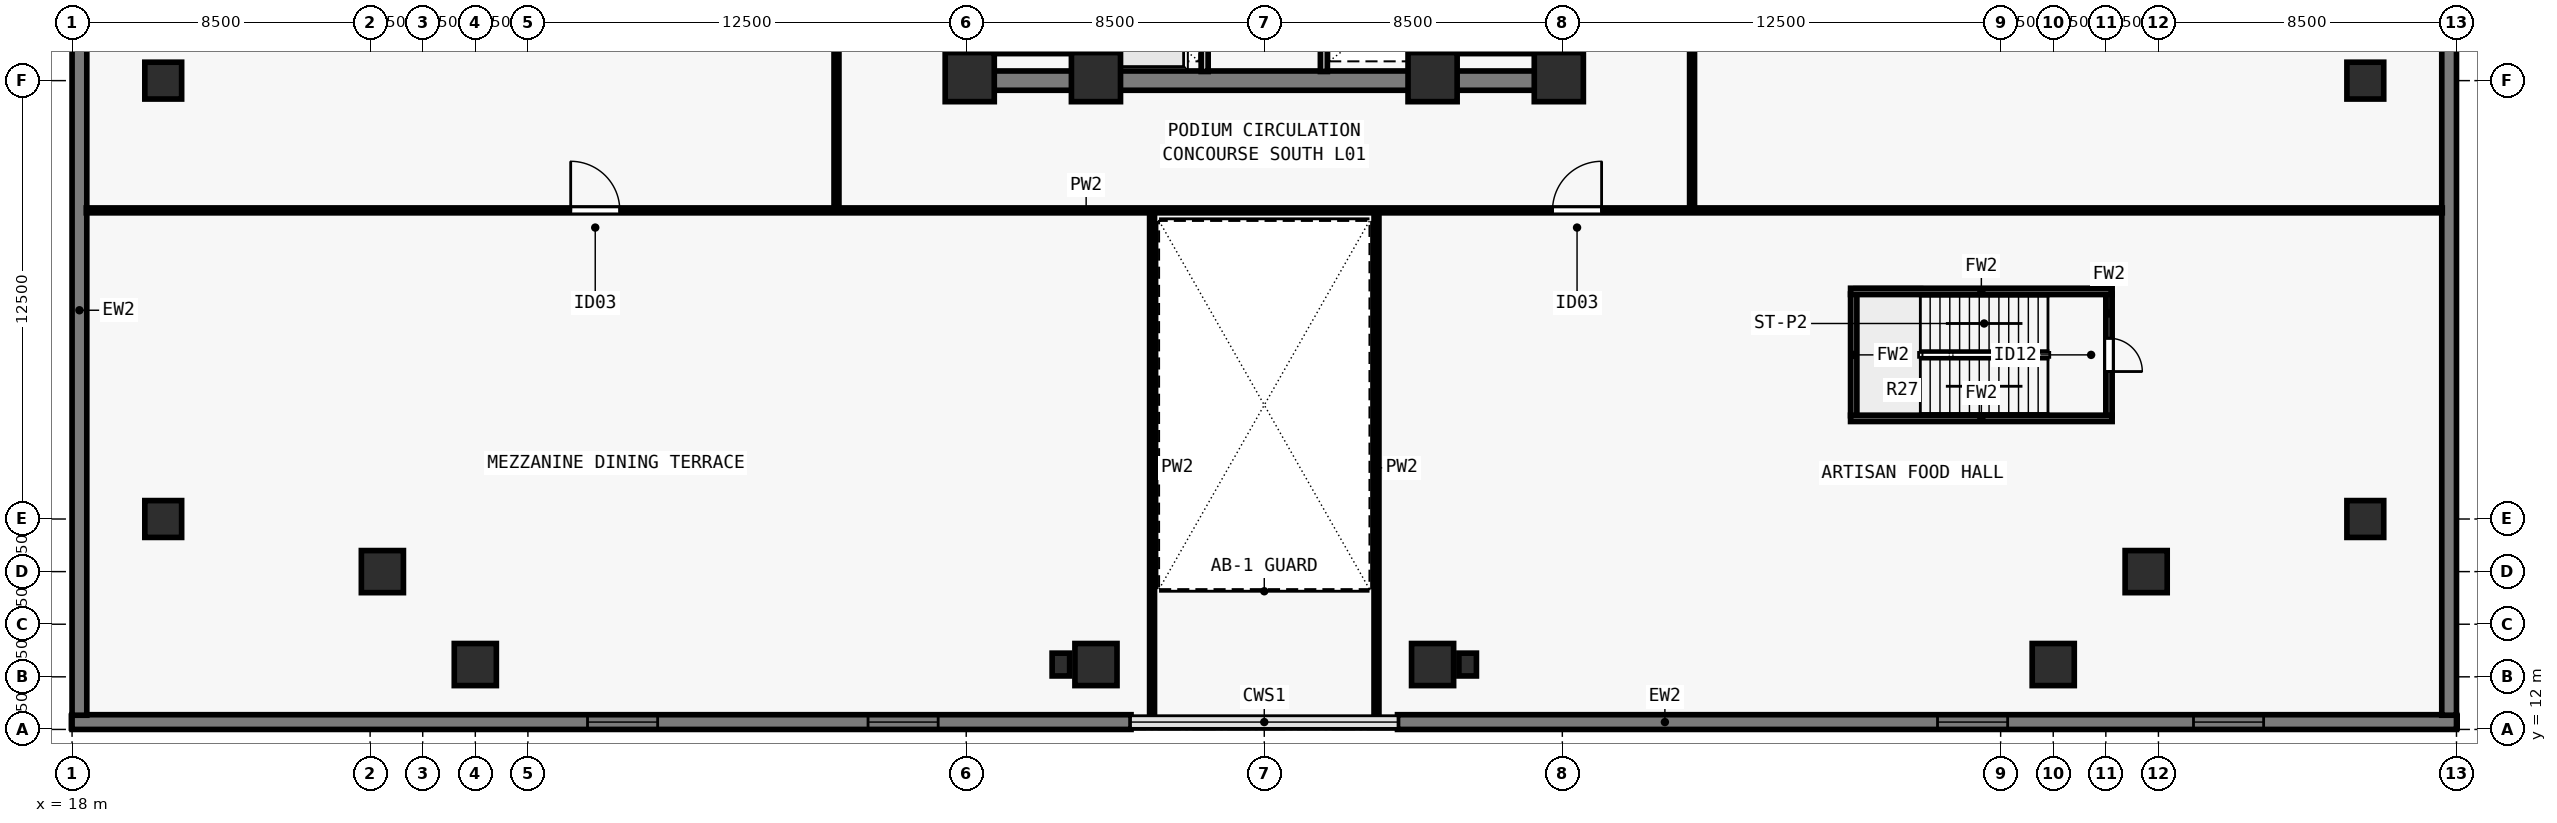
"""IFC4 building model, lengths in metres.
Left out: names, types, materials, properties, quantities, classifications, styles, units other than length and angle.
Written with IfcOpenShell. Run it as: python <this file> out.ifc"""

import sys

from ifc_helpers import new_model, si_unit, direction, frame, frame_2d, origin, origin_2d, place, context, subcontext, project, spatial, rectangle, extrude, element, fill, save


model = new_model("IFC4")
c1 = context("Model", 3, precision=1e-05, world=origin(), true_north=direction((0.0, 1.0)))
c2 = subcontext(c1, "Body", "Model", "MODEL_VIEW")
j1 = project(units=[si_unit("LENGTHUNIT", "METRE"), si_unit("PLANEANGLEUNIT", "RADIAN")], contexts=[c1])
p1 = place(None, origin())
s1 = spatial("IfcSite", under=j1, at=p1, CompositionType="ELEMENT")
p2 = place(p1, origin())
s2 = spatial("IfcBuilding", under=s1, at=p2, CompositionType="ELEMENT")
p3 = place(p2, frame((0.0, 0.0, 5.0)))
s3 = spatial("IfcBuildingStorey", under=s2, at=p3, CompositionType="ELEMENT", Elevation=5.0)
for number, where, z_axis, x_axis in (
    (1, (43.6, 30.6, 0.0), (0.0, 0.0, 1.0), (1.0, 0.0, 0.0)),
    (2, (47.2, 30.6, 0.0), (0.0, 0.0, 1.0), (1.0, 0.0, 0.0)),
    (3, (56.8, 30.6, 0.0), (0.0, 0.0, 1.0), (1.0, 0.0, 0.0)),
    (4, (60.4, 30.6, 0.0), (0.0, 0.0, 1.0), (1.0, 0.0, 0.0)),
):
    element("IfcColumn", number, at=place(p3, frame(where, z_axis=z_axis, x_axis=x_axis)), inside=s3, PredefinedType="COLUMN", context=c2, shape_type="SweptSolid", body=[
        extrude(rectangle(XDim=1.4, YDim=1.4, at=origin_2d()), origin(), (0.0, 0.0, 1.0), 5.0),
    ])
for number, where, z_axis, x_axis in (
    (5, (29.5, 13.85, 0.0), (0.0, 0.0, 1.0), (1.0, 0.0, 0.0)),
    (6, (47.2, 13.85, 0.0), (0.0, 0.0, 1.0), (1.0, 0.0, 0.0)),
    (7, (56.8, 13.85, 0.0), (0.0, 0.0, 1.0), (1.0, 0.0, 0.0)),
    (8, (74.5, 13.85, 0.0), (0.0, 0.0, 1.0), (1.0, 0.0, 0.0)),
    (9, (77.15, 16.5, 0.0), (0.0, 0.0, 1.0), (1.0, 0.0, 0.0)),
    (10, (26.85, 16.5, 0.0), (0.0, 0.0, 1.0), (1.0, 0.0, 0.0)),
):
    element("IfcColumn", number, at=place(p3, frame(where, z_axis=z_axis, x_axis=x_axis)), inside=s3, PredefinedType="COLUMN", context=c2, shape_type="SweptSolid", body=[
        extrude(rectangle(XDim=1.2, YDim=1.2, at=origin_2d()), origin(), (0.0, 0.0, 1.0), 5.0),
    ])
for number, where, z_axis, x_axis in (
    (11, (46.2, 13.85, 0.0), (0.0, 0.0, 1.0), (1.0, 0.0, 0.0)),
    (12, (57.8, 13.85, 0.0), (0.0, 0.0, 1.0), (1.0, 0.0, 0.0)),
):
    element("IfcColumn", number, at=place(p3, frame(where, z_axis=z_axis, x_axis=x_axis)), inside=s3, PredefinedType="PILASTER", context=c2, shape_type="SweptSolid", body=[
        extrude(rectangle(XDim=0.5, YDim=0.65, at=origin_2d()), origin(), (0.0, 0.0, 1.0), 5.0),
    ])
for number, where, z_axis, x_axis in (
    (13, (20.6, 18.0, 0.0), (0.0, 0.0, 1.0), (1.0, 0.0, 0.0)),
    (14, (20.6, 30.5, 0.0), (0.0, 0.0, 1.0), (1.0, 0.0, 0.0)),
    (15, (83.4, 18.0, 0.0), (0.0, 0.0, 1.0), (1.0, 0.0, 0.0)),
    (16, (83.4, 30.5, 0.0), (0.0, 0.0, 1.0), (1.0, 0.0, 0.0)),
):
    element("IfcColumn", number, at=place(p3, frame(where, z_axis=z_axis, x_axis=x_axis)), inside=s3, PredefinedType="COLUMN", context=c2, shape_type="SweptSolid", body=[
        extrude(rectangle(XDim=1.05, YDim=1.05, at=origin_2d()), origin(), (0.0, 0.0, 1.0), 5.0),
    ])
p4 = place(p3, frame((86.0, 12.21, 0.0), z_axis=(0.0, 0.0, 1.0), x_axis=(-1.0, 0.0, 0.0)))
e17 = element("IfcWall", 17, at=p4, inside=s3, PredefinedType="SOLIDWALL", context=c2, shape_type="SweptSolid", body=[
    extrude(rectangle(XDim=30.2, YDim=0.42, at=frame_2d((15.1, 0.0))), origin(), (0.0, 0.0, 1.0), 4.72),
])
p5 = place(p4, frame((5.5, 0.0, 0.8)))
e18 = element("IfcOpeningElement", 18, at=p5, cuts=e17, PredefinedType="OPENING", context=c2, shape_type="SweptSolid", body=[
    extrude(rectangle(XDim=2.0, YDim=2.4, at=frame_2d((1.0, 1.2))), frame((0.0, 0.22, 0.0), z_axis=(0.0, -1.0, 0.0), x_axis=(1.0, 0.0, 0.0)), (0.0, 0.0, 1.0), 0.44),
])
p6 = place(p4, frame((12.8, 0.0, 0.8)))
e19 = element("IfcOpeningElement", 19, at=p6, cuts=e17, PredefinedType="OPENING", context=c2, shape_type="SweptSolid", body=[
    extrude(rectangle(XDim=2.0, YDim=2.4, at=frame_2d((1.0, 1.2))), frame((0.0, 0.22, 0.0), z_axis=(0.0, -1.0, 0.0), x_axis=(1.0, 0.0, 0.0)), (0.0, 0.0, 1.0), 0.44),
])
p7 = place(p3, frame((48.2, 12.21, 0.0), z_axis=(0.0, 0.0, 1.0), x_axis=(-1.0, 0.0, 0.0)))
e20 = element("IfcWall", 20, at=p7, inside=s3, PredefinedType="SOLIDWALL", context=c2, shape_type="SweptSolid", body=[
    extrude(rectangle(XDim=30.2, YDim=0.42, at=frame_2d((15.1, 0.0))), origin(), (0.0, 0.0, 1.0), 4.72),
])
p8 = place(p7, frame((5.5, 0.0, 0.8)))
e21 = element("IfcOpeningElement", 21, at=p8, cuts=e20, PredefinedType="OPENING", context=c2, shape_type="SweptSolid", body=[
    extrude(rectangle(XDim=2.0, YDim=2.4, at=frame_2d((1.0, 1.2))), frame((0.0, 0.22, 0.0), z_axis=(0.0, -1.0, 0.0), x_axis=(1.0, 0.0, 0.0)), (0.0, 0.0, 1.0), 0.44),
])
p9 = place(p7, frame((13.5, 0.0, 0.8)))
e22 = element("IfcOpeningElement", 22, at=p9, cuts=e20, PredefinedType="OPENING", context=c2, shape_type="SweptSolid", body=[
    extrude(rectangle(XDim=2.0, YDim=2.4, at=frame_2d((1.0, 1.2))), frame((0.0, 0.22, 0.0), z_axis=(0.0, -1.0, 0.0), x_axis=(1.0, 0.0, 0.0)), (0.0, 0.0, 1.0), 0.44),
])
for number, where, z_axis, x_axis in (
    (23, (85.79, 35.5, 0.0), (0.0, 0.0, 1.0), (0.0, -1.0, 0.0)),
    (24, (18.21, 12.405, 0.0), (0.0, 0.0, 1.0), (0.0, 1.0, 0.0)),
):
    element("IfcWall", number, at=place(p3, frame(where, z_axis=z_axis, x_axis=x_axis)), inside=s3, PredefinedType="SOLIDWALL", context=c2, shape_type="SweptSolid", body=[
        extrude(rectangle(XDim=23.095, YDim=0.42, at=frame_2d((11.547, 0.0))), origin(), (0.0, 0.0, 1.0), 4.72),
    ])
p10 = place(p3, frame((43.225, 30.5, 0.0), z_axis=(0.0, 0.0, 1.0), x_axis=(1.0, 0.0, 0.0)))
e25 = element("IfcWall", 25, at=p10, inside=s3, PredefinedType="SHEAR", context=c2, shape_type="SweptSolid", body=[
    extrude(rectangle(XDim=17.55, YDim=0.55, at=frame_2d((8.775, 0.0))), origin(), (0.0, 0.0, 1.0), 4.72),
])
for number, where, z_axis, x_axis in (
    (26, (43.5, 30.765, 0.0), (0.0, 0.0, 1.0), (0.0, 1.0, 0.0)),
    (27, (60.5, 30.765, 0.0), (0.0, 0.0, 1.0), (0.0, 1.0, 0.0)),
):
    element("IfcWall", number, at=place(p3, frame(where, z_axis=z_axis, x_axis=x_axis)), inside=s3, PredefinedType="SHEAR", context=c2, shape_type="SweptSolid", body=[
        extrude(rectangle(XDim=7.985, YDim=0.55, at=frame_2d((3.993, 0.0))), origin(), (0.0, 0.0, 1.0), 4.72),
    ])
p11 = place(p3, frame((50.3, 30.76, 0.0), z_axis=(0.0, 0.0, 1.0), x_axis=(0.0, 1.0, 0.0)))
e28 = element("IfcWall", 28, at=p11, inside=s3, PredefinedType="SOLIDWALL", context=c2, shape_type="SweptSolid", body=[
    extrude(rectangle(XDim=7.855, YDim=0.2, at=frame_2d((3.927, 0.0))), origin(), (0.0, 0.0, 1.0), 4.72),
])
p12 = place(p11, frame((0.79, 0.0, 0.0)))
e29 = element("IfcOpeningElement", 29, at=p12, cuts=e28, PredefinedType="OPENING", context=c2, shape_type="SweptSolid", body=[
    extrude(rectangle(XDim=1.1, YDim=2.2, at=frame_2d((0.55, 1.1))), frame((0.0, 0.11, 0.0), z_axis=(0.0, -1.0, 0.0), x_axis=(1.0, 0.0, 0.0)), (0.0, 0.0, 1.0), 0.22),
])
p13 = place(p11, frame((3.49, 0.0, 0.0)))
e30 = element("IfcOpeningElement", 30, at=p13, cuts=e28, PredefinedType="OPENING", context=c2, shape_type="SweptSolid", body=[
    extrude(rectangle(XDim=1.1, YDim=2.2, at=frame_2d((0.55, 1.1))), frame((0.0, 0.11, 0.0), z_axis=(0.0, -1.0, 0.0), x_axis=(1.0, 0.0, 0.0)), (0.0, 0.0, 1.0), 0.22),
])
p14 = place(p11, frame((6.19, 0.0, 0.0)))
e31 = element("IfcOpeningElement", 31, at=p14, cuts=e28, PredefinedType="OPENING", context=c2, shape_type="SweptSolid", body=[
    extrude(rectangle(XDim=1.1, YDim=2.2, at=frame_2d((0.55, 1.1))), frame((0.0, 0.11, 0.0), z_axis=(0.0, -1.0, 0.0), x_axis=(1.0, 0.0, 0.0)), (0.0, 0.0, 1.0), 0.22),
])
p15 = place(p3, frame((53.7, 30.76, 0.0), z_axis=(0.0, 0.0, 1.0), x_axis=(0.0, 1.0, 0.0)))
e32 = element("IfcWall", 32, at=p15, inside=s3, PredefinedType="SOLIDWALL", context=c2, shape_type="SweptSolid", body=[
    extrude(rectangle(XDim=7.855, YDim=0.2, at=frame_2d((3.927, 0.0))), origin(), (0.0, 0.0, 1.0), 4.72),
])
for number, where, z_axis, x_axis in (
    (33, (47.35, 30.76, 0.0), (0.0, 0.0, 1.0), (0.0, 1.0, 0.0)),
    (34, (56.65, 30.76, 0.0), (0.0, 0.0, 1.0), (0.0, 1.0, 0.0)),
):
    element("IfcWall", number, at=place(p3, frame(where, z_axis=z_axis, x_axis=x_axis)), inside=s3, PredefinedType="SOLIDWALL", context=c2, shape_type="SweptSolid", body=[
        extrude(rectangle(XDim=7.855, YDim=0.18, at=frame_2d((3.927, 0.0))), origin(), (0.0, 0.0, 1.0), 4.72),
    ])
p16 = place(p3, frame((18.405, 26.8, 0.0), z_axis=(0.0, 0.0, 1.0), x_axis=(1.0, 0.0, 0.0)))
e35 = element("IfcWall", 35, at=p16, inside=s3, PredefinedType="PARTITIONING", context=c2, shape_type="SweptSolid", body=[
    extrude(rectangle(XDim=67.19, YDim=0.14, at=frame_2d((33.595, 0.0))), origin(), (0.0, 0.0, 1.0), 4.238),
])
p17 = place(p16, frame((13.815, 0.0, 0.0)))
e36 = element("IfcOpeningElement", 36, at=p17, cuts=e35, PredefinedType="OPENING", context=c2, shape_type="SweptSolid", body=[
    extrude(rectangle(XDim=1.4, YDim=2.2, at=frame_2d((0.7, 1.1))), frame((0.0, 0.08, 0.0), z_axis=(0.0, -1.0, 0.0), x_axis=(1.0, 0.0, 0.0)), (0.0, 0.0, 1.0), 0.16),
])
p18 = place(p16, frame((41.815, 0.0, 0.0)))
e37 = element("IfcOpeningElement", 37, at=p18, cuts=e35, PredefinedType="OPENING", context=c2, shape_type="SweptSolid", body=[
    extrude(rectangle(XDim=1.4, YDim=2.2, at=frame_2d((0.7, 1.1))), frame((0.0, 0.08, 0.0), z_axis=(0.0, -1.0, 0.0), x_axis=(1.0, 0.0, 0.0)), (0.0, 0.0, 1.0), 0.16),
])
p19 = place(p3, frame((39.8, 26.855, 0.0), z_axis=(0.0, 0.0, 1.0), x_axis=(0.0, 1.0, 0.0)))
e38 = element("IfcWall", 38, at=p19, inside=s3, PredefinedType="PARTITIONING", context=c2, shape_type="SweptSolid", body=[
    extrude(rectangle(XDim=24.29, YDim=0.14, at=frame_2d((12.145, 0.0))), origin(), (0.0, 0.0, 1.0), 4.72),
])
p20 = place(p19, frame((10.945, 0.0, 0.0)))
e39 = element("IfcOpeningElement", 39, at=p20, cuts=e38, PredefinedType="OPENING", context=c2, shape_type="SweptSolid", body=[
    extrude(rectangle(XDim=1.76, YDim=2.2, at=frame_2d((0.88, 1.1))), frame((0.0, 0.08, 0.0), z_axis=(0.0, -1.0, 0.0), x_axis=(1.0, 0.0, 0.0)), (0.0, 0.0, 1.0), 0.16),
])
p21 = place(p3, frame((64.2, 26.855, 0.0), z_axis=(0.0, 0.0, 1.0), x_axis=(0.0, 1.0, 0.0)))
e40 = element("IfcWall", 40, at=p21, inside=s3, PredefinedType="PARTITIONING", context=c2, shape_type="SweptSolid", body=[
    extrude(rectangle(XDim=24.29, YDim=0.14, at=frame_2d((12.145, 0.0))), origin(), (0.0, 0.0, 1.0), 4.72),
])
p22 = place(p21, frame((10.945, 0.0, 0.0)))
e41 = element("IfcOpeningElement", 41, at=p22, cuts=e40, PredefinedType="OPENING", context=c2, shape_type="SweptSolid", body=[
    extrude(rectangle(XDim=1.76, YDim=2.2, at=frame_2d((0.88, 1.1))), frame((0.0, 0.08, 0.0), z_axis=(0.0, -1.0, 0.0), x_axis=(1.0, 0.0, 0.0)), (0.0, 0.0, 1.0), 0.16),
])
for number, where, z_axis, x_axis in (
    (42, (48.8, 12.22, 0.0), (0.0, 0.0, 1.0), (0.0, 1.0, 0.0)),
    (43, (55.2, 12.22, 0.0), (0.0, 0.0, 1.0), (0.0, 1.0, 0.0)),
):
    element("IfcWall", number, at=place(p3, frame(where, z_axis=z_axis, x_axis=x_axis)), inside=s3, PredefinedType="PARTITIONING", context=c2, shape_type="SweptSolid", body=[
        extrude(rectangle(XDim=14.48, YDim=0.14, at=frame_2d((7.24, 0.0))), origin(), (0.0, 0.0, 1.0), 4.72),
    ])
p23 = place(p3, frame((43.765, 31.36, 0.0), z_axis=(0.0, 0.0, 1.0), x_axis=(1.0, 0.0, 0.0)))
e44 = element("IfcWall", 44, at=p23, inside=s3, PredefinedType="SOLIDWALL", context=c2, shape_type="SweptSolid", body=[
    extrude(rectangle(XDim=3.23, YDim=0.18, at=frame_2d((1.615, 0.0))), origin(), (0.0, 0.0, 1.0), 4.72),
])
p24 = place(p3, frame((47.07, 38.78, 0.0), z_axis=(0.0, 0.0, 1.0), x_axis=(0.0, -1.0, 0.0)))
e45 = element("IfcWall", 45, at=p24, inside=s3, PredefinedType="SOLIDWALL", context=c2, shape_type="SweptSolid", body=[
    extrude(rectangle(XDim=8.017, YDim=0.18, at=frame_2d((4.009, 0.0))), origin(), (0.0, 0.0, 1.0), 4.72),
])
p25 = place(p3, frame((57.005, 31.36, 0.0), z_axis=(0.0, 0.0, 1.0), x_axis=(1.0, 0.0, 0.0)))
e46 = element("IfcWall", 46, at=p25, inside=s3, PredefinedType="SOLIDWALL", context=c2, shape_type="SweptSolid", body=[
    extrude(rectangle(XDim=3.23, YDim=0.18, at=frame_2d((1.615, 0.0))), origin(), (0.0, 0.0, 1.0), 4.72),
])
p26 = place(p3, frame((56.93, 38.78, 0.0), z_axis=(0.0, 0.0, 1.0), x_axis=(0.0, -1.0, 0.0)))
e47 = element("IfcWall", 47, at=p26, inside=s3, PredefinedType="SOLIDWALL", context=c2, shape_type="SweptSolid", body=[
    extrude(rectangle(XDim=8.017, YDim=0.18, at=frame_2d((4.009, 0.0))), origin(), (0.0, 0.0, 1.0), 4.72),
])
p27 = place(p3, frame((76.09, 24.415, 0.0), z_axis=(0.0, 0.0, 1.0), x_axis=(0.0, -1.0, 0.0)))
e48 = element("IfcWall", 48, at=p27, inside=s3, PredefinedType="SOLIDWALL", context=c2, shape_type="SweptSolid", body=[
    extrude(rectangle(XDim=3.47, YDim=0.18, at=frame_2d((1.735, 0.0))), origin(), (0.0, 0.0, 1.0), 4.72),
])
p28 = place(p27, frame((1.26, 0.0, 0.0)))
e49 = element("IfcOpeningElement", 49, at=p28, cuts=e48, PredefinedType="OPENING", context=c2, shape_type="SweptSolid", body=[
    extrude(rectangle(XDim=0.95, YDim=2.15, at=frame_2d((0.475, 1.075))), frame((0.0, 0.1, 0.0), z_axis=(0.0, -1.0, 0.0), x_axis=(1.0, 0.0, 0.0)), (0.0, 0.0, 1.0), 0.2),
])
p29 = place(p3, frame((68.81, 24.415, 0.0), z_axis=(0.0, 0.0, 1.0), x_axis=(0.0, -1.0, 0.0)))
e50 = element("IfcWall", 50, at=p29, inside=s3, PredefinedType="SOLIDWALL", context=c2, shape_type="SweptSolid", body=[
    extrude(rectangle(XDim=3.47, YDim=0.18, at=frame_2d((1.735, 0.0))), origin(), (0.0, 0.0, 1.0), 4.72),
])
for number, where, z_axis, x_axis in (
    (51, (76.18, 24.49, 0.0), (0.0, 0.0, 1.0), (-1.0, 0.0, 0.0)),
    (52, (76.18, 20.87, 0.0), (0.0, 0.0, 1.0), (-1.0, 0.0, 0.0)),
):
    element("IfcWall", number, at=place(p3, frame(where, z_axis=z_axis, x_axis=x_axis)), inside=s3, PredefinedType="SOLIDWALL", context=c2, shape_type="SweptSolid", body=[
        extrude(rectangle(XDim=7.46, YDim=0.18, at=frame_2d((3.73, 0.0))), origin(), (0.0, 0.0, 1.0), 4.72),
    ])
p30 = place(p5, origin())
e53 = element("IfcWindow", 53, at=p30, inside=s3, PartitioningType="SINGLE_PANEL", PredefinedType="WINDOW", context=c2, shape_type="SweptSolid", body=[
    extrude(rectangle(XDim=2.0, YDim=2.4, at=frame_2d((1.0, 1.2))), frame((0.0, -0.05, 0.0), z_axis=(0.0, -1.0, 0.0), x_axis=(1.0, 0.0, 0.0)), (0.0, 0.0, 1.0), 0.06),
])
fill(e18, e53)
p31 = place(p6, origin())
e54 = element("IfcWindow", 54, at=p31, inside=s3, PartitioningType="SINGLE_PANEL", PredefinedType="WINDOW", context=c2, shape_type="SweptSolid", body=[
    extrude(rectangle(XDim=2.0, YDim=2.4, at=frame_2d((1.0, 1.2))), frame((0.0, -0.05, 0.0), z_axis=(0.0, -1.0, 0.0), x_axis=(1.0, 0.0, 0.0)), (0.0, 0.0, 1.0), 0.06),
])
fill(e19, e54)
p32 = place(p8, origin())
e55 = element("IfcWindow", 55, at=p32, inside=s3, PartitioningType="SINGLE_PANEL", PredefinedType="WINDOW", context=c2, shape_type="SweptSolid", body=[
    extrude(rectangle(XDim=2.0, YDim=2.4, at=frame_2d((1.0, 1.2))), frame((0.0, -0.05, 0.0), z_axis=(0.0, -1.0, 0.0), x_axis=(1.0, 0.0, 0.0)), (0.0, 0.0, 1.0), 0.06),
])
fill(e21, e55)
p33 = place(p9, origin())
e56 = element("IfcWindow", 56, at=p33, inside=s3, PartitioningType="SINGLE_PANEL", PredefinedType="WINDOW", context=c2, shape_type="SweptSolid", body=[
    extrude(rectangle(XDim=2.0, YDim=2.4, at=frame_2d((1.0, 1.2))), frame((0.0, -0.05, 0.0), z_axis=(0.0, -1.0, 0.0), x_axis=(1.0, 0.0, 0.0)), (0.0, 0.0, 1.0), 0.06),
])
fill(e22, e56)
p34 = place(p17, origin())
e57 = element("IfcDoor", 57, at=p34, inside=s3, OperationType="SINGLE_SWING_LEFT", PredefinedType="DOOR", context=c2, shape_type="SweptSolid", body=[
    extrude(rectangle(XDim=1.4, YDim=2.2, at=frame_2d((0.7, 1.1))), frame((0.0, 0.025, 0.0), z_axis=(0.0, -1.0, 0.0), x_axis=(1.0, 0.0, 0.0)), (0.0, 0.0, 1.0), 0.05),
])
fill(e36, e57)
p35 = place(p18, origin())
e58 = element("IfcDoor", 58, at=p35, inside=s3, OperationType="SINGLE_SWING_RIGHT", PredefinedType="DOOR", context=c2, shape_type="SweptSolid", body=[
    extrude(rectangle(XDim=1.4, YDim=2.2, at=frame_2d((0.7, 1.1))), frame((0.0, 0.025, 0.0), z_axis=(0.0, -1.0, 0.0), x_axis=(1.0, 0.0, 0.0)), (0.0, 0.0, 1.0), 0.05),
])
fill(e37, e58)
p36 = place(p28, origin())
e59 = element("IfcDoor", 59, at=p36, inside=s3, OperationType="SINGLE_SWING_RIGHT", PredefinedType="DOOR", context=c2, shape_type="SweptSolid", body=[
    extrude(rectangle(XDim=0.95, YDim=2.15, at=frame_2d((0.475, 1.075))), frame((0.0, 0.025, 0.0), z_axis=(0.0, -1.0, 0.0), x_axis=(1.0, 0.0, 0.0)), (0.0, 0.0, 1.0), 0.05),
])
fill(e49, e59)
save(model, sys.argv[1])
